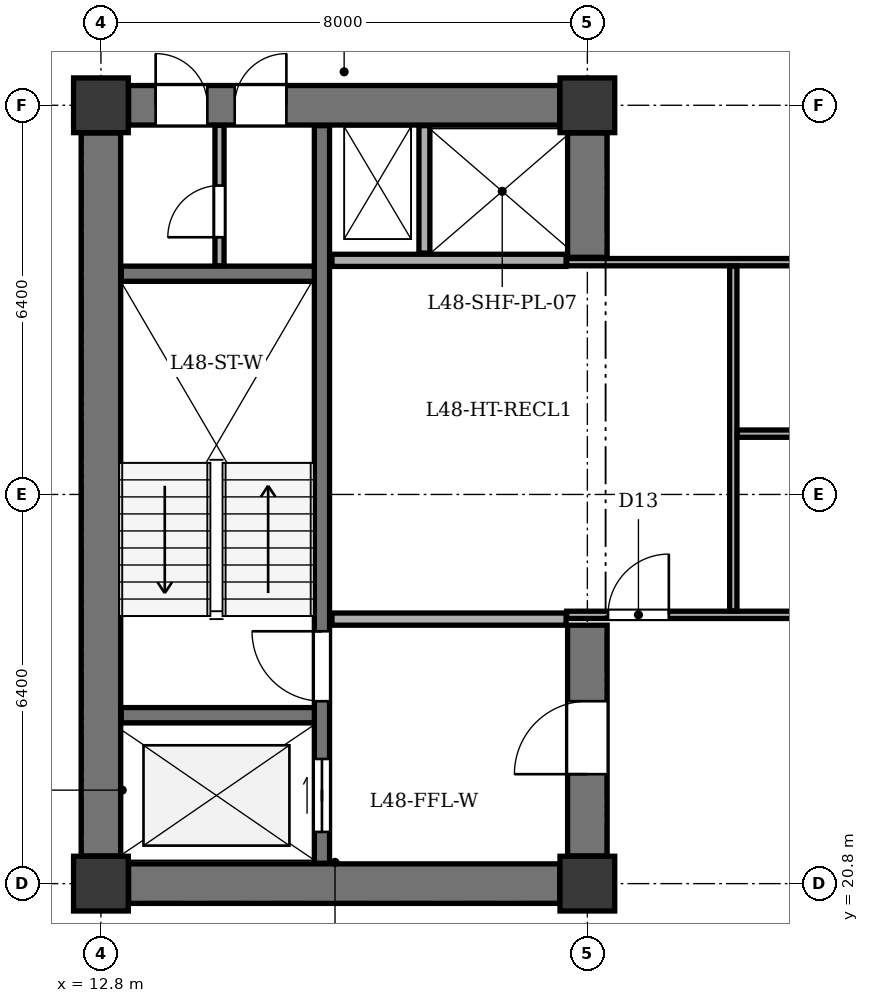
"""IFC4 building model, lengths in metres.
Left out: names, types, materials, properties, quantities, classifications, styles, units other than length and angle.
Written with IfcOpenShell. Run it as: python <this file> out.ifc"""

import sys

from ifc_helpers import new_model, si_unit, direction, frame, frame_2d, origin, origin_2d, place, context, subcontext, project, spatial, rectangle, extrude, element, fill, save


model = new_model("IFC4")
c1 = context("Model", 3, precision=1e-05, world=origin(), true_north=direction((0.0, 1.0)))
c2 = subcontext(c1, "Body", "Model", "MODEL_VIEW")
j1 = project(units=[si_unit("LENGTHUNIT", "METRE"), si_unit("PLANEANGLEUNIT", "RADIAN")], contexts=[c1])
p1 = place(None, origin())
s1 = spatial("IfcSite", under=j1, at=p1, CompositionType="ELEMENT")
p2 = place(p1, origin())
s2 = spatial("IfcBuilding", under=s1, at=p2, CompositionType="ELEMENT")
p3 = place(p2, frame((0.0, 0.0, 186.8)))
s3 = spatial("IfcBuildingStorey", under=s2, at=p3, CompositionType="ELEMENT", Elevation=186.8)
for number, where, z_axis, x_axis in (
    (1, (12.8, 20.8, 0.0), (0.0, 0.0, 1.0), (1.0, 0.0, 0.0)),
    (2, (20.8, 20.8, 0.0), (0.0, 0.0, 1.0), (1.0, 0.0, 0.0)),
    (3, (12.8, 33.6, 0.0), (0.0, 0.0, 1.0), (1.0, 0.0, 0.0)),
    (4, (20.8, 33.6, 0.0), (0.0, 0.0, 1.0), (1.0, 0.0, 0.0)),
):
    element("IfcColumn", number, at=place(p3, frame(where, z_axis=z_axis, x_axis=x_axis)), inside=s3, PredefinedType="COLUMN", context=c2, shape_type="SweptSolid", body=[
        extrude(rectangle(XDim=0.9, YDim=0.9, at=origin_2d()), origin(), (0.0, 0.0, 1.0), 3.5),
    ])
p4 = place(p3, frame((12.8, 21.255, 0.0), z_axis=(0.0, 0.0, 1.0), x_axis=(0.0, 1.0, 0.0)))
e5 = element("IfcWall", 5, at=p4, inside=s3, PredefinedType="SHEAR", context=c2, shape_type="SweptSolid", body=[
    extrude(rectangle(XDim=11.89, YDim=0.65, at=frame_2d((5.945, 0.0))), origin(), (0.0, 0.0, 1.0), 3.2),
])
p5 = place(p3, frame((13.255, 20.8, 0.0), z_axis=(0.0, 0.0, 1.0), x_axis=(1.0, 0.0, 0.0)))
e6 = element("IfcWall", 6, at=p5, inside=s3, PredefinedType="SHEAR", context=c2, shape_type="SweptSolid", body=[
    extrude(rectangle(XDim=7.09, YDim=0.65, at=frame_2d((3.545, 0.0))), origin(), (0.0, 0.0, 1.0), 3.2),
])
p6 = place(p3, frame((13.255, 33.6, 0.0), z_axis=(0.0, 0.0, 1.0), x_axis=(1.0, 0.0, 0.0)))
e7 = element("IfcWall", 7, at=p6, inside=s3, PredefinedType="SHEAR", context=c2, shape_type="SweptSolid", body=[
    extrude(rectangle(XDim=7.09, YDim=0.65, at=frame_2d((3.545, 0.0))), origin(), (0.0, 0.0, 1.0), 3.2),
])
p7 = place(p6, frame((0.445, 0.0, 0.0)))
e8 = element("IfcOpeningElement", 8, at=p7, cuts=e7, PredefinedType="OPENING", context=c2, shape_type="SweptSolid", body=[
    extrude(rectangle(XDim=0.85, YDim=2.02, at=frame_2d((0.425, 1.01))), frame((0.0, 0.335, 0.0), z_axis=(0.0, -1.0, 0.0), x_axis=(1.0, 0.0, 0.0)), (0.0, 0.0, 1.0), 0.67),
])
p8 = place(p6, frame((1.745, 0.0, 0.0)))
e9 = element("IfcOpeningElement", 9, at=p8, cuts=e7, PredefinedType="OPENING", context=c2, shape_type="SweptSolid", body=[
    extrude(rectangle(XDim=0.85, YDim=2.02, at=frame_2d((0.425, 1.01))), frame((0.0, 0.335, 0.0), z_axis=(0.0, -1.0, 0.0), x_axis=(1.0, 0.0, 0.0)), (0.0, 0.0, 1.0), 0.67),
])
p9 = place(p3, frame((20.8, 21.255, 0.0), z_axis=(0.0, 0.0, 1.0), x_axis=(0.0, 1.0, 0.0)))
e10 = element("IfcWall", 10, at=p9, inside=s3, PredefinedType="SHEAR", context=c2, shape_type="SweptSolid", body=[
    extrude(rectangle(XDim=3.795, YDim=0.65, at=frame_2d((1.897, 0.0))), origin(), (0.0, 0.0, 1.0), 3.2),
])
p10 = place(p9, frame((1.345, 0.0, 0.0)))
e11 = element("IfcOpeningElement", 11, at=p10, cuts=e10, PredefinedType="OPENING", context=c2, shape_type="SweptSolid", body=[
    extrude(rectangle(XDim=1.2, YDim=2.15, at=frame_2d((0.6, 1.075))), frame((0.0, 0.335, 0.0), z_axis=(0.0, -1.0, 0.0), x_axis=(1.0, 0.0, 0.0)), (0.0, 0.0, 1.0), 0.67),
])
p11 = place(p3, frame((20.8, 31.1, 0.0), z_axis=(0.0, 0.0, 1.0), x_axis=(0.0, 1.0, 0.0)))
e12 = element("IfcWall", 12, at=p11, inside=s3, PredefinedType="SHEAR", context=c2, shape_type="SweptSolid", body=[
    extrude(rectangle(XDim=2.045, YDim=0.65, at=frame_2d((1.022, 0.0))), origin(), (0.0, 0.0, 1.0), 3.2),
])
p12 = place(p3, frame((16.435, 21.135, 0.0), z_axis=(0.0, 0.0, 1.0), x_axis=(0.0, 1.0, 0.0)))
e13 = element("IfcWall", 13, at=p12, inside=s3, PredefinedType="SHEAR", context=c2, shape_type="SweptSolid", body=[
    extrude(rectangle(XDim=12.13, YDim=0.25, at=frame_2d((6.065, 0.0))), origin(), (0.0, 0.0, 1.0), 3.2),
])
p13 = place(p12, frame((0.515, 0.0, 0.0)))
e14 = element("IfcOpeningElement", 14, at=p13, cuts=e13, PredefinedType="OPENING", context=c2, shape_type="SweptSolid", body=[
    extrude(rectangle(XDim=1.2, YDim=2.15, at=frame_2d((0.6, 1.075))), frame((0.0, 0.135, 0.0), z_axis=(0.0, -1.0, 0.0), x_axis=(1.0, 0.0, 0.0)), (0.0, 0.0, 1.0), 0.27),
])
p14 = place(p12, frame((2.665, 0.0, 0.0)))
e15 = element("IfcOpeningElement", 15, at=p14, cuts=e13, PredefinedType="OPENING", context=c2, shape_type="SweptSolid", body=[
    extrude(rectangle(XDim=1.15, YDim=2.15, at=frame_2d((0.575, 1.075))), frame((0.0, 0.135, 0.0), z_axis=(0.0, -1.0, 0.0), x_axis=(1.0, 0.0, 0.0)), (0.0, 0.0, 1.0), 0.27),
])
for number, where, z_axis, x_axis in (
    (16, (13.135, 23.57, 0.0), (0.0, 0.0, 1.0), (1.0, 0.0, 0.0)),
    (17, (13.135, 30.83, 0.0), (0.0, 0.0, 1.0), (1.0, 0.0, 0.0)),
):
    element("IfcWall", number, at=place(p3, frame(where, z_axis=z_axis, x_axis=x_axis)), inside=s3, PredefinedType="SHEAR", context=c2, shape_type="SweptSolid", body=[
        extrude(rectangle(XDim=3.175, YDim=0.25, at=frame_2d((1.587, 0.0))), origin(), (0.0, 0.0, 1.0), 3.2),
    ])
for number, where, z_axis, x_axis in (
    (18, (16.6, 25.15, 0.0), (0.0, 0.0, 1.0), (1.0, 0.0, 0.0)),
    (19, (16.6, 31.05, 0.0), (0.0, 0.0, 1.0), (1.0, 0.0, 0.0)),
):
    element("IfcWall", number, at=place(p3, frame(where, z_axis=z_axis, x_axis=x_axis)), inside=s3, PredefinedType="SOLIDWALL", context=c2, shape_type="SweptSolid", body=[
        extrude(rectangle(XDim=3.85, YDim=0.2, at=frame_2d((1.925, 0.0))), origin(), (0.0, 0.0, 1.0), 3.2),
    ])
p15 = place(p3, frame((18.12, 31.17, 0.0), z_axis=(0.0, 0.0, 1.0), x_axis=(0.0, 1.0, 0.0)))
e20 = element("IfcWall", 20, at=p15, inside=s3, PredefinedType="PARTITIONING", context=c2, shape_type="SweptSolid", body=[
    extrude(rectangle(XDim=2.095, YDim=0.18, at=frame_2d((1.047, 0.0))), origin(), (0.0, 0.0, 1.0), 3.2),
])
p16 = place(p3, frame((14.75, 30.96, 0.0), z_axis=(0.0, 0.0, 1.0), x_axis=(0.0, 1.0, 0.0)))
e21 = element("IfcWall", 21, at=p16, inside=s3, PredefinedType="PARTITIONING", context=c2, shape_type="SweptSolid", body=[
    extrude(rectangle(XDim=2.31, YDim=0.15, at=frame_2d((1.155, 0.0))), origin(), (0.0, 0.0, 1.0), 3.2),
])
p17 = place(p16, frame((0.47, 0.0, 0.0)))
e22 = element("IfcOpeningElement", 22, at=p17, cuts=e21, PredefinedType="OPENING", context=c2, shape_type="SweptSolid", body=[
    extrude(rectangle(XDim=0.85, YDim=2.02, at=frame_2d((0.425, 1.01))), frame((0.0, 0.085, 0.0), z_axis=(0.0, -1.0, 0.0), x_axis=(1.0, 0.0, 0.0)), (0.0, 0.0, 1.0), 0.17),
])
p18 = place(p3, frame((20.46, 25.22, 0.0), z_axis=(0.0, 0.0, 1.0), x_axis=(1.0, 0.0, 0.0)))
e23 = element("IfcWall", 23, at=p18, inside=s3, PredefinedType="PARTITIONING", context=c2, shape_type="SweptSolid", body=[
    extrude(rectangle(XDim=11.94, YDim=0.12, at=frame_2d((5.97, 0.0))), origin(), (0.0, 0.0, 1.0), 3.2),
])
p19 = place(p18, frame((0.68, 0.0, 0.0)))
e24 = element("IfcOpeningElement", 24, at=p19, cuts=e23, PredefinedType="OPENING", context=c2, shape_type="SweptSolid", body=[
    extrude(rectangle(XDim=1.0, YDim=2.1, at=frame_2d((0.5, 1.05))), frame((0.0, 0.07, 0.0), z_axis=(0.0, -1.0, 0.0), x_axis=(1.0, 0.0, 0.0)), (0.0, 0.0, 1.0), 0.14),
])
p20 = place(p3, frame((20.46, 31.02, 0.0), z_axis=(0.0, 0.0, 1.0), x_axis=(1.0, 0.0, 0.0)))
e25 = element("IfcWall", 25, at=p20, inside=s3, PredefinedType="PARTITIONING", context=c2, shape_type="SweptSolid", body=[
    extrude(rectangle(XDim=11.94, YDim=0.12, at=frame_2d((5.97, 0.0))), origin(), (0.0, 0.0, 1.0), 3.2),
])
p21 = place(p3, frame((23.2, 25.285, 0.0), z_axis=(0.0, 0.0, 1.0), x_axis=(0.0, 1.0, 0.0)))
e26 = element("IfcWall", 26, at=p21, inside=s3, PredefinedType="PARTITIONING", context=c2, shape_type="SweptSolid", body=[
    extrude(rectangle(XDim=5.67, YDim=0.12, at=frame_2d((2.835, 0.0))), origin(), (0.0, 0.0, 1.0), 3.2),
])
p22 = place(p3, frame((23.265, 28.2, 0.0), z_axis=(0.0, 0.0, 1.0), x_axis=(1.0, 0.0, 0.0)))
e27 = element("IfcWall", 27, at=p22, inside=s3, PredefinedType="PARTITIONING", context=c2, shape_type="SweptSolid", body=[
    extrude(rectangle(XDim=9.07, YDim=0.12, at=frame_2d((4.535, 0.0))), origin(), (0.0, 0.0, 1.0), 3.2),
])
p23 = place(p7, origin())
e28 = element("IfcDoor", 28, at=p23, inside=s3, OperationType="SINGLE_SWING_LEFT", PredefinedType="DOOR", context=c2, shape_type="SweptSolid", body=[
    extrude(rectangle(XDim=0.85, YDim=2.02, at=frame_2d((0.425, 1.01))), frame((0.0, 0.025, 0.0), z_axis=(0.0, -1.0, 0.0), x_axis=(1.0, 0.0, 0.0)), (0.0, 0.0, 1.0), 0.05),
])
fill(e8, e28)
p24 = place(p8, origin())
e29 = element("IfcDoor", 29, at=p24, inside=s3, OperationType="SINGLE_SWING_RIGHT", PredefinedType="DOOR", context=c2, shape_type="SweptSolid", body=[
    extrude(rectangle(XDim=0.85, YDim=2.02, at=frame_2d((0.425, 1.01))), frame((0.0, 0.025, 0.0), z_axis=(0.0, -1.0, 0.0), x_axis=(1.0, 0.0, 0.0)), (0.0, 0.0, 1.0), 0.05),
])
fill(e9, e29)
p25 = place(p10, origin())
e30 = element("IfcDoor", 30, at=p25, inside=s3, OperationType="SINGLE_SWING_LEFT", PredefinedType="DOOR", context=c2, shape_type="SweptSolid", body=[
    extrude(rectangle(XDim=1.2, YDim=2.15, at=frame_2d((0.6, 1.075))), frame((0.0, 0.025, 0.0), z_axis=(0.0, -1.0, 0.0), x_axis=(1.0, 0.0, 0.0)), (0.0, 0.0, 1.0), 0.05),
])
fill(e11, e30)
p26 = place(p13, origin())
e31 = element("IfcDoor", 31, at=p26, inside=s3, OperationType="DOUBLE_DOOR_SLIDING", PredefinedType="DOOR", context=c2, shape_type="SweptSolid", body=[
    extrude(rectangle(XDim=1.2, YDim=2.15, at=frame_2d((0.6, 1.075))), frame((0.0, 0.025, 0.0), z_axis=(0.0, -1.0, 0.0), x_axis=(1.0, 0.0, 0.0)), (0.0, 0.0, 1.0), 0.05),
])
fill(e14, e31)
p27 = place(p14, origin())
e32 = element("IfcDoor", 32, at=p27, inside=s3, OperationType="SINGLE_SWING_RIGHT", PredefinedType="DOOR", context=c2, shape_type="SweptSolid", body=[
    extrude(rectangle(XDim=1.15, YDim=2.15, at=frame_2d((0.575, 1.075))), frame((0.0, 0.025, 0.0), z_axis=(0.0, -1.0, 0.0), x_axis=(1.0, 0.0, 0.0)), (0.0, 0.0, 1.0), 0.05),
])
fill(e15, e32)
p28 = place(p17, origin())
e33 = element("IfcDoor", 33, at=p28, inside=s3, OperationType="SINGLE_SWING_LEFT", PredefinedType="DOOR", context=c2, shape_type="SweptSolid", body=[
    extrude(rectangle(XDim=0.85, YDim=2.02, at=frame_2d((0.425, 1.01))), frame((0.0, 0.025, 0.0), z_axis=(0.0, -1.0, 0.0), x_axis=(1.0, 0.0, 0.0)), (0.0, 0.0, 1.0), 0.05),
])
fill(e22, e33)
p29 = place(p19, origin())
e34 = element("IfcDoor", 34, at=p29, inside=s3, OperationType="SINGLE_SWING_RIGHT", PredefinedType="DOOR", context=c2, shape_type="SweptSolid", body=[
    extrude(rectangle(XDim=1.0, YDim=2.1, at=frame_2d((0.5, 1.05))), frame((0.0, 0.025, 0.0), z_axis=(0.0, -1.0, 0.0), x_axis=(1.0, 0.0, 0.0)), (0.0, 0.0, 1.0), 0.05),
])
fill(e24, e34)
save(model, sys.argv[1])
